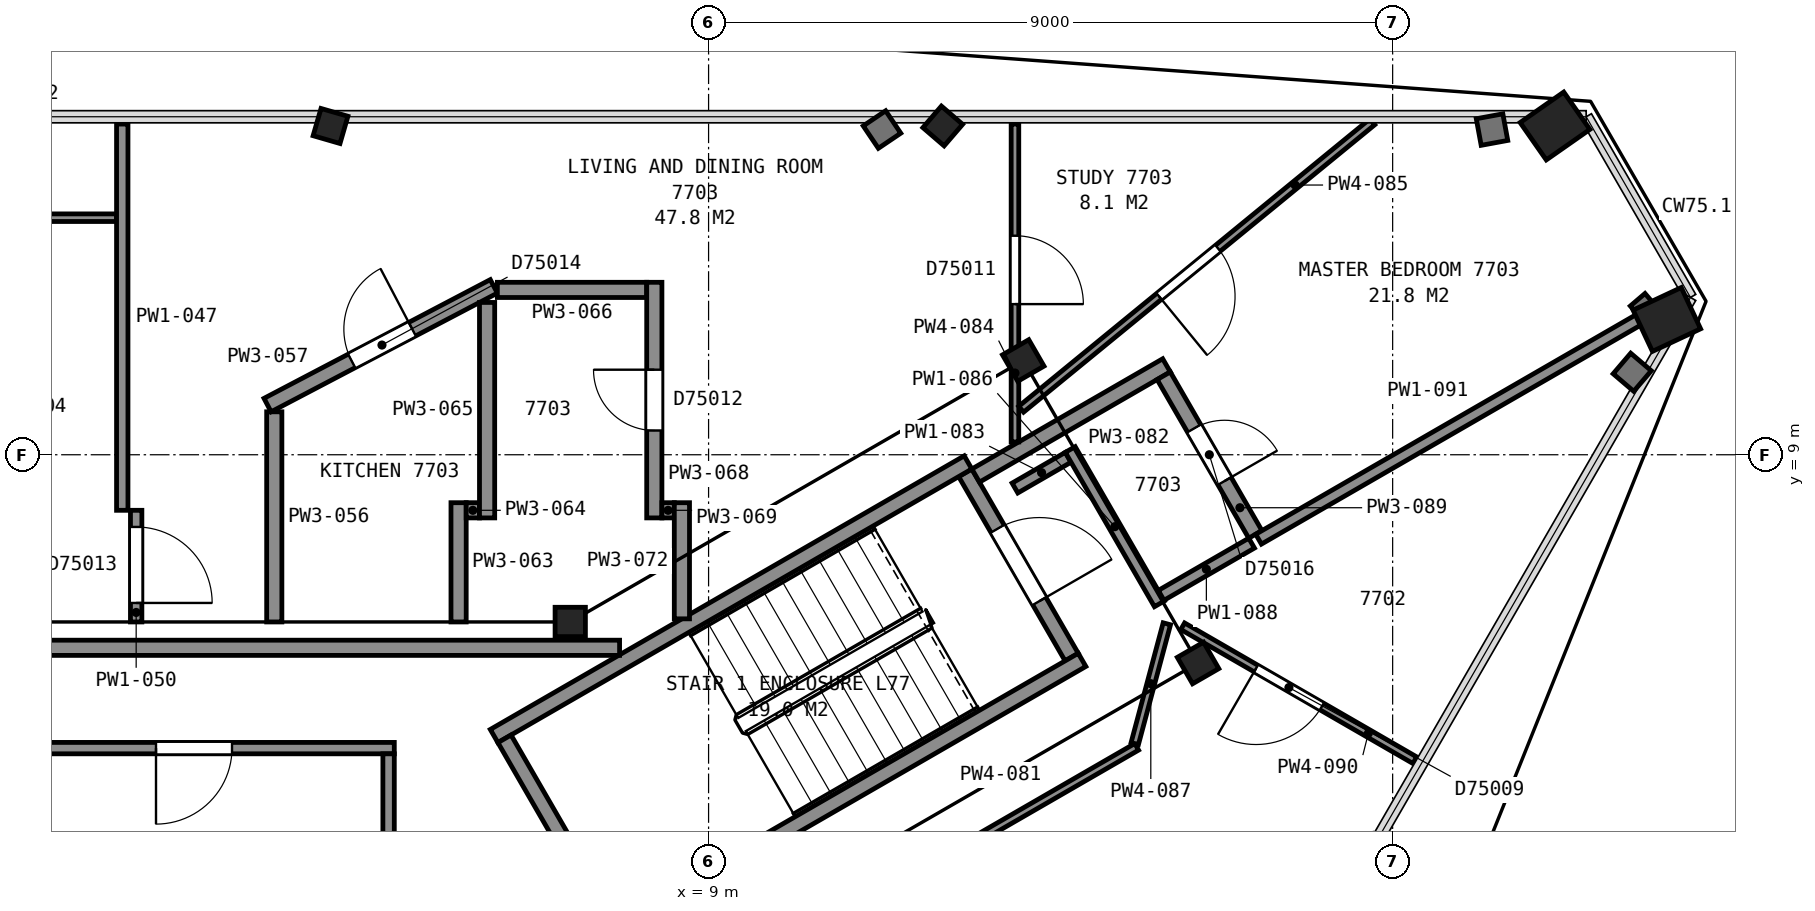
"""IFC4 building model, lengths in metres.
Left out: names, types, materials, properties, quantities, classifications, styles, units other than length and angle.
Written with IfcOpenShell. Run it as: python <this file> out.ifc"""

import sys

from ifc_helpers import new_model, si_unit, direction, frame, frame_2d, origin, origin_2d, place, context, subcontext, project, spatial, rectangle, hollow_rectangle, i_section, extrude, element, fill, save


model = new_model("IFC4")
c1 = context("Model", 3, precision=1e-05, world=origin(), true_north=direction((0.0, 1.0)))
c2 = subcontext(c1, "Body", "Model", "MODEL_VIEW")
j1 = project(units=[si_unit("LENGTHUNIT", "METRE"), si_unit("PLANEANGLEUNIT", "RADIAN")], contexts=[c1])
p1 = place(None, origin())
s1 = spatial("IfcSite", under=j1, at=p1, CompositionType="ELEMENT")
p2 = place(p1, origin())
s2 = spatial("IfcBuilding", under=s1, at=p2, CompositionType="ELEMENT")
p3 = place(p2, frame((0.0, 0.0, 304.7)))
s3 = spatial("IfcBuildingStorey", under=s2, at=p3, CompositionType="ELEMENT", Elevation=304.7)
p4 = place(p3, frame((20.565, 13.626, 0.09), z_axis=(-0.349540963312, -0.244465386581, 0.904465471829), x_axis=(0.499636006059, -0.86527489038, -0.040782662093)))
e1 = element("IfcColumn", 1, at=p4, inside=s3, PredefinedType="COLUMN", context=c2, shape_type="SweptSolid", body=[
    extrude(hollow_rectangle(XDim=0.6, YDim=0.7, WallThickness=0.04, at=origin_2d()), origin(), (0.0, 0.0, 1.0), 3.892),
])
p5 = place(p3, frame((12.347, 13.635, 0.055), z_axis=(-0.218944088069, -0.254559334695, 0.94194640581), x_axis=(0.974036747124, -4.8635043e-05, 0.226389957566)))
e2 = element("IfcColumn", 2, at=p5, inside=s3, PredefinedType="COLUMN", context=c2, shape_type="SweptSolid", body=[
    extrude(i_section(OverallWidth=0.373, OverallDepth=0.368, WebThickness=0.015, FlangeThickness=0.024, FilletRadius=0.015, at=origin_2d()), origin(), (0.0, 0.0, 1.0), 3.811),
])
p6 = place(p3, frame((4.116, 13.638, 0.045), z_axis=(-0.075454530978, -0.260152118886, 0.962614922383), x_axis=(0.996942757007, -3.6761517e-05, 0.078135381871)))
e3 = element("IfcColumn", 3, at=p6, inside=s3, PredefinedType="COLUMN", context=c2, shape_type="SweptSolid", body=[
    extrude(i_section(OverallWidth=0.373, OverallDepth=0.368, WebThickness=0.015, FlangeThickness=0.024, FilletRadius=0.015, at=origin_2d()), origin(), (0.0, 0.0, 1.0), 3.75),
])
p7 = place(p3, frame((17.981, 3.876, 0.055), z_axis=(-0.328547208417, -0.061145929932, 0.942506184115), x_axis=(-0.48718313333, -0.843929861769, -0.224577343052)))
e4 = element("IfcColumn", 4, at=p7, inside=s3, PredefinedType="COLUMN", context=c2, shape_type="SweptSolid", body=[
    extrude(i_section(OverallWidth=0.373, OverallDepth=0.368, WebThickness=0.015, FlangeThickness=0.024, FilletRadius=0.015, at=origin_2d()), origin(), (0.0, 0.0, 1.0), 3.809),
])
p8 = place(p3, frame((22.082, 11.002, 0.09), z_axis=(-0.386249226446, -0.1808602436, 0.904489418045), x_axis=(0.499519388937, -0.865365975723, 0.040275403639)))
e5 = element("IfcColumn", 5, at=p8, inside=s3, PredefinedType="COLUMN", context=c2, shape_type="SweptSolid", body=[
    extrude(hollow_rectangle(XDim=0.6, YDim=0.7, WallThickness=0.04, at=origin_2d()), origin(), (0.0, 0.0, 1.0), 3.892),
])
for number, where, z_axis, x_axis in (
    (6, (15.44, 6.26, 0.0), (0.0, 0.0, 1.0), (0.5, -0.866, 0.0)),
    (7, (13.14, 10.24, 0.0), (0.0, 0.0, 1.0), (0.5, -0.866, 0.0)),
):
    element("IfcColumn", number, at=place(p3, frame(where, z_axis=z_axis, x_axis=x_axis)), inside=s3, PredefinedType="COLUMN", context=c2, shape_type="SweptSolid", body=[
        extrude(i_section(OverallWidth=0.401, OverallDepth=0.399, WebThickness=0.025, FlangeThickness=0.04, FilletRadius=0.015, at=origin_2d()), origin(), (0.0, 0.0, 1.0), 3.7),
    ])
p9 = place(p3, frame((7.18, 6.8, 0.0), z_axis=(0.0, 0.0, 1.0), x_axis=(1.0, 0.0, 0.0)))
e8 = element("IfcColumn", 8, at=p9, inside=s3, PredefinedType="COLUMN", context=c2, shape_type="SweptSolid", body=[
    extrude(i_section(OverallWidth=0.399, OverallDepth=0.386, WebThickness=0.021, FlangeThickness=0.033, FilletRadius=0.015, at=origin_2d()), origin(), (0.0, 0.0, 1.0), 3.7),
])
p10 = place(p3, frame((13.777, 6.338, 0.0), z_axis=(0.0, 0.0, 1.0), x_axis=(-0.500049511043, 0.865996816683, 0.0)))
e9 = element("IfcWall", 9, at=p10, inside=s3, PredefinedType="PARTITIONING", context=c2, shape_type="SweptSolid", body=[
    extrude(rectangle(XDim=2.8, YDim=0.2, at=frame_2d((1.4, 0.0))), origin(), (0.0, 0.0, 1.0), 3.45),
])
p11 = place(p10, frame((0.85, 0.0, 0.0)))
e10 = element("IfcOpeningElement", 10, at=p11, cuts=e9, PredefinedType="OPENING", context=c2, shape_type="SweptSolid", body=[
    extrude(rectangle(XDim=1.1, YDim=2.1, at=frame_2d((0.55, 1.05))), frame((0.0, 0.11, 0.0), z_axis=(0.0, -1.0, 0.0), x_axis=(1.0, 0.0, 0.0)), (0.0, 0.0, 1.0), 0.22),
])
for number, where, z_axis, x_axis in (
    (11, (6.178, 5.299, 0.0), (0.0, 0.0, 1.0), (0.866, 0.5, 0.0)),
    (12, (7.678, 2.701, 0.0), (0.0, 0.0, 1.0), (0.866, 0.5, 0.0)),
):
    element("IfcWall", number, at=place(p3, frame(where, z_axis=z_axis, x_axis=x_axis)), inside=s3, PredefinedType="PARTITIONING", context=c2, shape_type="SweptSolid", body=[
        extrude(rectangle(XDim=7.2, YDim=0.2, at=frame_2d((3.6, 0.0))), origin(), (0.0, 0.0, 1.0), 3.45),
    ])
p12 = place(p3, frame((7.715, 2.838, 0.0), z_axis=(0.0, 0.0, 1.0), x_axis=(-0.500049511043, 0.865996816683, 0.0)))
e13 = element("IfcWall", 13, at=p12, inside=s3, PredefinedType="PARTITIONING", context=c2, shape_type="SweptSolid", body=[
    extrude(rectangle(XDim=2.8, YDim=0.2, at=frame_2d((1.4, 0.0))), origin(), (0.0, 0.0, 1.0), 3.45),
])
p13 = place(p3, frame((7.829, 6.46, 0.0), z_axis=(0.0, 0.0, 1.0), x_axis=(-1.0, 0.0, 0.0)))
e14 = element("IfcWall", 14, at=p13, inside=s3, PredefinedType="PARTITIONING", context=c2, shape_type="SweptSolid", body=[
    extrude(rectangle(XDim=15.658, YDim=0.2, at=frame_2d((7.829, 0.0))), origin(), (0.0, 0.0, 1.0), 3.45),
])
p14 = place(p13, frame((12.168, 0.0, 0.0)))
e15 = element("IfcOpeningElement", 15, at=p14, cuts=e14, PredefinedType="OPENING", context=c2, shape_type="SweptSolid", body=[
    extrude(rectangle(XDim=1.2, YDim=2.1, at=frame_2d((0.6, 1.05))), frame((0.0, 0.11, 0.0), z_axis=(0.0, -1.0, 0.0), x_axis=(1.0, 0.0, 0.0)), (0.0, 0.0, 1.0), 0.22),
])
p15 = place(p3, frame((-0.245, 5.14, 0.0), z_axis=(0.0, 0.0, 1.0), x_axis=(1.0, 0.0, 0.0)))
e16 = element("IfcWall", 16, at=p15, inside=s3, PredefinedType="PARTITIONING", context=c2, shape_type="SweptSolid", body=[
    extrude(rectangle(XDim=5.11, YDim=0.15, at=frame_2d((2.555, 0.0))), origin(), (0.0, 0.0, 1.0), 3.45),
])
p16 = place(p15, frame((1.975, 0.0, 0.0)))
e17 = element("IfcOpeningElement", 17, at=p16, cuts=e16, PredefinedType="OPENING", context=c2, shape_type="SweptSolid", body=[
    extrude(rectangle(XDim=1.0, YDim=2.1, at=frame_2d((0.5, 1.05))), frame((0.0, 0.085, 0.0), z_axis=(0.0, -1.0, 0.0), x_axis=(1.0, 0.0, 0.0)), (0.0, 0.0, 1.0), 0.17),
])
p17 = place(p3, frame((4.79, 2.085, 0.0), z_axis=(0.0, 0.0, 1.0), x_axis=(0.0, 1.0, 0.0)))
e18 = element("IfcWall", 18, at=p17, inside=s3, PredefinedType="PARTITIONING", context=c2, shape_type="SweptSolid", body=[
    extrude(rectangle(XDim=2.98, YDim=0.15, at=frame_2d((1.49, 0.0))), origin(), (0.0, 0.0, 1.0), 3.45),
])
p18 = place(p3, frame((-3.109, 12.119, 0.0), z_axis=(0.0, 0.0, 1.0), x_axis=(1.0, 0.0, 0.0)))
e19 = element("IfcWall", 19, at=p18, inside=s3, PredefinedType="PARTITIONING", context=c2, shape_type="SweptSolid", body=[
    extrude(rectangle(XDim=4.32, YDim=0.1, at=frame_2d((2.16, 0.0))), origin(), (0.0, 0.0, 1.0), 2.723),
])
p19 = place(p18, frame((1.7, 0.0, 0.0)))
e20 = element("IfcOpeningElement", 20, at=p19, cuts=e19, PredefinedType="OPENING", context=c2, shape_type="SweptSolid", body=[
    extrude(rectangle(XDim=1.0, YDim=2.1, at=frame_2d((0.5, 1.05))), frame((0.0, 0.06, 0.0), z_axis=(0.0, -1.0, 0.0), x_axis=(1.0, 0.0, 0.0)), (0.0, 0.0, 1.0), 0.12),
])
p20 = place(p3, frame((1.286, 8.269, 0.0), z_axis=(0.0, 0.0, 1.0), x_axis=(0.0, 1.0, 0.0)))
e21 = element("IfcWall", 21, at=p20, inside=s3, PredefinedType="PARTITIONING", context=c2, shape_type="SweptSolid", body=[
    extrude(rectangle(XDim=5.082, YDim=0.15, at=frame_2d((2.541, 0.0))), origin(), (0.0, 0.0, 1.0), 2.723),
])
p21 = place(p3, frame((1.469, 8.269, 0.0), z_axis=(0.0, 0.0, 1.0), x_axis=(0.0, -1.0, 0.0)))
e22 = element("IfcWall", 22, at=p21, inside=s3, PredefinedType="PARTITIONING", context=c2, shape_type="SweptSolid", body=[
    extrude(rectangle(XDim=1.469, YDim=0.15, at=frame_2d((0.734, 0.0))), origin(), (0.0, 0.0, 1.0), 2.723),
])
p22 = place(p21, frame((0.219, 0.0, 0.0)))
e23 = element("IfcOpeningElement", 23, at=p22, cuts=e22, PredefinedType="OPENING", context=c2, shape_type="SweptSolid", body=[
    extrude(rectangle(XDim=1.0, YDim=2.1, at=frame_2d((0.5, 1.05))), frame((0.0, 0.085, 0.0), z_axis=(0.0, -1.0, 0.0), x_axis=(1.0, 0.0, 0.0)), (0.0, 0.0, 1.0), 0.17),
])
p23 = place(p3, frame((3.286, 6.8, 0.0), z_axis=(0.0, 0.0, 1.0), x_axis=(0.0, 1.0, 0.0)))
e24 = element("IfcWall", 24, at=p23, inside=s3, PredefinedType="PARTITIONING", context=c2, shape_type="SweptSolid", body=[
    extrude(rectangle(XDim=2.765, YDim=0.2, at=frame_2d((1.382, 0.0))), origin(), (0.0, 0.0, 1.0), 2.723),
])
p24 = place(p3, frame((6.175, 11.216, 0.0), z_axis=(0.0, 0.0, 1.0), x_axis=(-0.885512941371, -0.464614712062, 0.0)))
e25 = element("IfcWall", 25, at=p24, inside=s3, PredefinedType="PARTITIONING", context=c2, shape_type="SweptSolid", body=[
    extrude(rectangle(XDim=3.362, YDim=0.2, at=frame_2d((1.681, 0.0))), origin(), (0.0, 0.0, 1.0), 2.723),
])
p25 = place(p24, frame((1.212, 0.0, 0.0)))
e26 = element("IfcOpeningElement", 26, at=p25, cuts=e25, PredefinedType="OPENING", context=c2, shape_type="SweptSolid", body=[
    extrude(rectangle(XDim=0.9, YDim=2.1, at=frame_2d((0.45, 1.05))), frame((0.0, 0.11, 0.0), z_axis=(0.0, -1.0, 0.0), x_axis=(1.0, 0.0, 0.0)), (0.0, 0.0, 1.0), 0.22),
])
p26 = place(p3, frame((5.711, 6.8, 0.0), z_axis=(0.0, 0.0, 1.0), x_axis=(0.0, 1.0, 0.0)))
e27 = element("IfcWall", 27, at=p26, inside=s3, PredefinedType="PARTITIONING", context=c2, shape_type="SweptSolid", body=[
    extrude(rectangle(XDim=1.569, YDim=0.2, at=frame_2d((0.784, 0.0))), origin(), (0.0, 0.0, 1.0), 2.723),
])
p27 = place(p3, frame((5.811, 8.269, 0.0), z_axis=(0.0, 0.0, 1.0), x_axis=(1.0, 0.0, 0.0)))
e28 = element("IfcWall", 28, at=p27, inside=s3, PredefinedType="PARTITIONING", context=c2, shape_type="SweptSolid", body=[
    extrude(rectangle(XDim=0.175, YDim=0.2, at=frame_2d((0.087, 0.0))), origin(), (0.0, 0.0, 1.0), 2.723),
])
p28 = place(p3, frame((6.086, 8.169, 0.0), z_axis=(0.0, 0.0, 1.0), x_axis=(0.0, 1.0, 0.0)))
e29 = element("IfcWall", 29, at=p28, inside=s3, PredefinedType="PARTITIONING", context=c2, shape_type="SweptSolid", body=[
    extrude(rectangle(XDim=2.835, YDim=0.2, at=frame_2d((1.417, 0.0))), origin(), (0.0, 0.0, 1.0), 2.723),
])
p29 = place(p3, frame((6.221, 11.169, 0.0), z_axis=(0.0, 0.0, 1.0), x_axis=(1.0, 0.0, 0.0)))
e30 = element("IfcWall", 30, at=p29, inside=s3, PredefinedType="PARTITIONING", context=c2, shape_type="SweptSolid", body=[
    extrude(rectangle(XDim=1.965, YDim=0.2, at=frame_2d((0.982, 0.0))), origin(), (0.0, 0.0, 1.0), 2.723),
])
p30 = place(p3, frame((8.286, 8.169, 0.0), z_axis=(0.0, 0.0, 1.0), x_axis=(0.0, 1.0, 0.0)))
e31 = element("IfcWall", 31, at=p30, inside=s3, PredefinedType="PARTITIONING", context=c2, shape_type="SweptSolid", body=[
    extrude(rectangle(XDim=3.1, YDim=0.2, at=frame_2d((1.55, 0.0))), origin(), (0.0, 0.0, 1.0), 2.723),
])
p31 = place(p30, frame((1.15, 0.0, 0.0)))
e32 = element("IfcOpeningElement", 32, at=p31, cuts=e31, PredefinedType="OPENING", context=c2, shape_type="SweptSolid", body=[
    extrude(rectangle(XDim=0.8, YDim=2.1, at=frame_2d((0.4, 1.05))), frame((0.0, 0.11, 0.0), z_axis=(0.0, -1.0, 0.0), x_axis=(1.0, 0.0, 0.0)), (0.0, 0.0, 1.0), 0.22),
])
p32 = place(p3, frame((8.386, 8.269, 0.0), z_axis=(0.0, 0.0, 1.0), x_axis=(1.0, 0.0, 0.0)))
e33 = element("IfcWall", 33, at=p32, inside=s3, PredefinedType="PARTITIONING", context=c2, shape_type="SweptSolid", body=[
    extrude(rectangle(XDim=0.163, YDim=0.2, at=frame_2d((0.082, 0.0))), origin(), (0.0, 0.0, 1.0), 2.723),
])
p33 = place(p3, frame((8.649, 6.841, 0.0), z_axis=(0.0, 0.0, 1.0), x_axis=(0.0, 1.0, 0.0)))
e34 = element("IfcWall", 34, at=p33, inside=s3, PredefinedType="PARTITIONING", context=c2, shape_type="SweptSolid", body=[
    extrude(rectangle(XDim=1.528, YDim=0.2, at=frame_2d((0.764, 0.0))), origin(), (0.0, 0.0, 1.0), 2.723),
])
p34 = place(p3, frame((12.156, 3.727, 0.0), z_axis=(0.0, 0.0, 1.0), x_axis=(0.866012137121, 0.500022977831, 0.0)))
e35 = element("IfcWall", 35, at=p34, inside=s3, PredefinedType="PARTITIONING", context=c2, shape_type="SweptSolid", body=[
    extrude(rectangle(XDim=2.86, YDim=0.1, at=frame_2d((1.43, 0.0))), origin(), (0.0, 0.0, 1.0), 2.723),
])
p35 = place(p3, frame((12.514, 8.726, 0.0), z_axis=(0.0, 0.0, 1.0), x_axis=(0.865969617579, 0.500096612097, 0.0)))
e36 = element("IfcWall", 36, at=p35, inside=s3, PredefinedType="PARTITIONING", context=c2, shape_type="SweptSolid", body=[
    extrude(rectangle(XDim=2.899, YDim=0.2, at=frame_2d((1.45, 0.0))), origin(), (0.0, 0.0, 1.0), 2.723),
])
p36 = place(p3, frame((13.031, 8.562, 0.0), z_axis=(0.0, 0.0, 1.0), x_axis=(0.865798205633, 0.500393312429, 0.0)))
e37 = element("IfcWall", 37, at=p36, inside=s3, PredefinedType="PARTITIONING", context=c2, shape_type="SweptSolid", body=[
    extrude(rectangle(XDim=0.808, YDim=0.15, at=frame_2d((0.404, 0.0))), origin(), (0.0, 0.0, 1.0), 2.723),
])
p37 = place(p3, frame((13.031, 13.351, 0.0), z_axis=(0.0, 0.0, 1.0), x_axis=(0.0, -1.0, 0.0)))
e38 = element("IfcWall", 38, at=p37, inside=s3, PredefinedType="PARTITIONING", context=c2, shape_type="SweptSolid", body=[
    extrude(rectangle(XDim=4.183, YDim=0.1, at=frame_2d((2.091, 0.0))), origin(), (0.0, 0.0, 1.0), 2.723),
])
p38 = place(p37, frame((1.469, 0.0, 0.0)))
e39 = element("IfcOpeningElement", 39, at=p38, cuts=e38, PredefinedType="OPENING", context=c2, shape_type="SweptSolid", body=[
    extrude(rectangle(XDim=0.9, YDim=2.1, at=frame_2d((0.45, 1.05))), frame((0.0, 0.06, 0.0), z_axis=(0.0, -1.0, 0.0), x_axis=(1.0, 0.0, 0.0)), (0.0, 0.0, 1.0), 0.12),
])
p39 = place(p3, frame((17.733, 13.38, 0.0), z_axis=(0.0, 0.0, 1.0), x_axis=(-0.773858908961, -0.633358025939, 0.0)))
e40 = element("IfcWall", 40, at=p39, inside=s3, PredefinedType="PARTITIONING", context=c2, shape_type="SweptSolid", body=[
    extrude(rectangle(XDim=5.97, YDim=0.1, at=frame_2d((2.985, 0.0))), origin(), (0.0, 0.0, 1.0), 2.723),
])
p40 = place(p39, frame((2.626, 0.0, 0.0)))
e41 = element("IfcOpeningElement", 41, at=p40, cuts=e40, PredefinedType="OPENING", context=c2, shape_type="SweptSolid", body=[
    extrude(rectangle(XDim=1.0, YDim=2.1, at=frame_2d((0.5, 1.05))), frame((0.0, 0.06, 0.0), z_axis=(0.0, -1.0, 0.0), x_axis=(1.0, 0.0, 0.0)), (0.0, 0.0, 1.0), 0.12),
])
p41 = place(p3, frame((13.759, 9.069, 0.0), z_axis=(0.0, 0.0, 1.0), x_axis=(0.500046885369, -0.865998332812, 0.0)))
e42 = element("IfcWall", 42, at=p41, inside=s3, PredefinedType="PARTITIONING", context=c2, shape_type="SweptSolid", body=[
    extrude(rectangle(XDim=2.345, YDim=0.15, at=frame_2d((1.172, 0.0))), origin(), (0.0, 0.0, 1.0), 2.723),
])
p42 = place(p3, frame((14.607, 5.2, 0.0), z_axis=(0.0, 0.0, 1.0), x_axis=(0.258519214507, 0.966006115783, 0.0)))
e43 = element("IfcWall", 43, at=p42, inside=s3, PredefinedType="PARTITIONING", context=c2, shape_type="SweptSolid", body=[
    extrude(rectangle(XDim=1.632, YDim=0.1, at=frame_2d((0.816, 0.0))), origin(), (0.0, 0.0, 1.0), 2.723),
])
p43 = place(p3, frame((14.954, 7.149, 0.0), z_axis=(0.0, 0.0, 1.0), x_axis=(0.865960792519, 0.5001118933, 0.0)))
e44 = element("IfcWall", 44, at=p43, inside=s3, PredefinedType="PARTITIONING", context=c2, shape_type="SweptSolid", body=[
    extrude(rectangle(XDim=1.375, YDim=0.15, at=frame_2d((0.688, 0.0))), origin(), (0.0, 0.0, 1.0), 2.723),
])
p44 = place(p3, frame((16.194, 7.952, 0.0), z_axis=(0.0, 0.0, 1.0), x_axis=(-0.500125724882, 0.865952804321, 0.0)))
e45 = element("IfcWall", 45, at=p44, inside=s3, PredefinedType="PARTITIONING", context=c2, shape_type="SweptSolid", body=[
    extrude(rectangle(XDim=2.411, YDim=0.2, at=frame_2d((1.205, 0.0))), origin(), (0.0, 0.0, 1.0), 2.723),
])
p45 = place(p44, frame((0.811, 0.0, 0.0)))
e46 = element("IfcOpeningElement", 46, at=p45, cuts=e45, PredefinedType="OPENING", context=c2, shape_type="SweptSolid", body=[
    extrude(rectangle(XDim=0.8, YDim=2.1, at=frame_2d((0.4, 1.05))), frame((0.0, 0.11, 0.0), z_axis=(0.0, -1.0, 0.0), x_axis=(1.0, 0.0, 0.0)), (0.0, 0.0, 1.0), 0.22),
])
p46 = place(p3, frame((15.238, 6.744, 0.0), z_axis=(0.0, 0.0, 1.0), x_axis=(0.866104892567, -0.49986229611, 0.0)))
e47 = element("IfcWall", 47, at=p46, inside=s3, PredefinedType="PARTITIONING", context=c2, shape_type="SweptSolid", body=[
    extrude(rectangle(XDim=3.526, YDim=0.1, at=frame_2d((1.763, 0.0))), origin(), (0.0, 0.0, 1.0), 2.723),
])
p47 = place(p46, frame((1.114, 0.0, 0.0)))
e48 = element("IfcOpeningElement", 48, at=p47, cuts=e47, PredefinedType="OPENING", context=c2, shape_type="SweptSolid", body=[
    extrude(rectangle(XDim=1.0, YDim=2.1, at=frame_2d((0.5, 1.05))), frame((0.0, 0.06, 0.0), z_axis=(0.0, -1.0, 0.0), x_axis=(1.0, 0.0, 0.0)), (0.0, 0.0, 1.0), 0.12),
])
p48 = place(p3, frame((16.236, 7.889, 0.0), z_axis=(0.0, 0.0, 1.0), x_axis=(0.865995456094, 0.500051867335, 0.0)))
e49 = element("IfcWall", 49, at=p48, inside=s3, PredefinedType="PARTITIONING", context=c2, shape_type="SweptSolid", body=[
    extrude(rectangle(XDim=6.415, YDim=0.15, at=frame_2d((3.208, 0.0))), origin(), (0.0, 0.0, 1.0), 2.723),
])
p49 = place(p11, origin())
e50 = element("IfcDoor", 50, at=p49, inside=s3, OperationType="SINGLE_SWING_LEFT", PredefinedType="DOOR", context=c2, shape_type="SweptSolid", body=[
    extrude(rectangle(XDim=1.1, YDim=2.1, at=frame_2d((0.55, 1.05))), frame((0.0, 0.025, 0.0), z_axis=(0.0, -1.0, 0.0), x_axis=(1.0, 0.0, 0.0)), (0.0, 0.0, 1.0), 0.05),
])
fill(e10, e50)
p50 = place(p16, origin())
e51 = element("IfcDoor", 51, at=p50, inside=s3, OperationType="SINGLE_SWING_LEFT", PredefinedType="DOOR", context=c2, shape_type="SweptSolid", body=[
    extrude(rectangle(XDim=1.0, YDim=2.1, at=frame_2d((0.5, 1.05))), frame((0.0, 0.025, 0.0), z_axis=(0.0, -1.0, 0.0), x_axis=(1.0, 0.0, 0.0)), (0.0, 0.0, 1.0), 0.05),
])
fill(e17, e51)
p51 = place(p22, origin())
e52 = element("IfcDoor", 52, at=p51, inside=s3, OperationType="SINGLE_SWING_RIGHT", PredefinedType="DOOR", context=c2, shape_type="SweptSolid", body=[
    extrude(rectangle(XDim=1.0, YDim=2.1, at=frame_2d((0.5, 1.05))), frame((0.0, 0.025, 0.0), z_axis=(0.0, -1.0, 0.0), x_axis=(1.0, 0.0, 0.0)), (0.0, 0.0, 1.0), 0.05),
])
fill(e23, e52)
p52 = place(p25, origin())
e53 = element("IfcDoor", 53, at=p52, inside=s3, OperationType="SINGLE_SWING_LEFT", PredefinedType="DOOR", context=c2, shape_type="SweptSolid", body=[
    extrude(rectangle(XDim=0.9, YDim=2.1, at=frame_2d((0.45, 1.05))), frame((0.0, 0.025, 0.0), z_axis=(0.0, -1.0, 0.0), x_axis=(1.0, 0.0, 0.0)), (0.0, 0.0, 1.0), 0.05),
])
fill(e26, e53)
p53 = place(p31, origin())
e54 = element("IfcDoor", 54, at=p53, inside=s3, OperationType="SINGLE_SWING_RIGHT", PredefinedType="DOOR", context=c2, shape_type="SweptSolid", body=[
    extrude(rectangle(XDim=0.8, YDim=2.1, at=frame_2d((0.4, 1.05))), frame((0.0, 0.025, 0.0), z_axis=(0.0, -1.0, 0.0), x_axis=(1.0, 0.0, 0.0)), (0.0, 0.0, 1.0), 0.05),
])
fill(e32, e54)
p54 = place(p38, origin())
e55 = element("IfcDoor", 55, at=p54, inside=s3, OperationType="SINGLE_SWING_RIGHT", PredefinedType="DOOR", context=c2, shape_type="SweptSolid", body=[
    extrude(rectangle(XDim=0.9, YDim=2.1, at=frame_2d((0.45, 1.05))), frame((0.0, 0.025, 0.0), z_axis=(0.0, -1.0, 0.0), x_axis=(1.0, 0.0, 0.0)), (0.0, 0.0, 1.0), 0.05),
])
fill(e39, e55)
p55 = place(p40, origin())
e56 = element("IfcDoor", 56, at=p55, inside=s3, OperationType="SINGLE_SWING_RIGHT", PredefinedType="DOOR", context=c2, shape_type="SweptSolid", body=[
    extrude(rectangle(XDim=1.0, YDim=2.1, at=frame_2d((0.5, 1.05))), frame((0.0, 0.025, 0.0), z_axis=(0.0, -1.0, 0.0), x_axis=(1.0, 0.0, 0.0)), (0.0, 0.0, 1.0), 0.05),
])
fill(e41, e56)
p56 = place(p45, origin())
e57 = element("IfcDoor", 57, at=p56, inside=s3, OperationType="SINGLE_SWING_LEFT", PredefinedType="DOOR", context=c2, shape_type="SweptSolid", body=[
    extrude(rectangle(XDim=0.8, YDim=2.1, at=frame_2d((0.4, 1.05))), frame((0.0, 0.025, 0.0), z_axis=(0.0, -1.0, 0.0), x_axis=(1.0, 0.0, 0.0)), (0.0, 0.0, 1.0), 0.05),
])
fill(e46, e57)
p57 = place(p47, origin())
e58 = element("IfcDoor", 58, at=p57, inside=s3, OperationType="SINGLE_SWING_LEFT", PredefinedType="DOOR", context=c2, shape_type="SweptSolid", body=[
    extrude(rectangle(XDim=1.0, YDim=2.1, at=frame_2d((0.5, 1.05))), frame((0.0, 0.025, 0.0), z_axis=(0.0, -1.0, 0.0), x_axis=(1.0, 0.0, 0.0)), (0.0, 0.0, 1.0), 0.05),
])
fill(e48, e58)
save(model, sys.argv[1])
